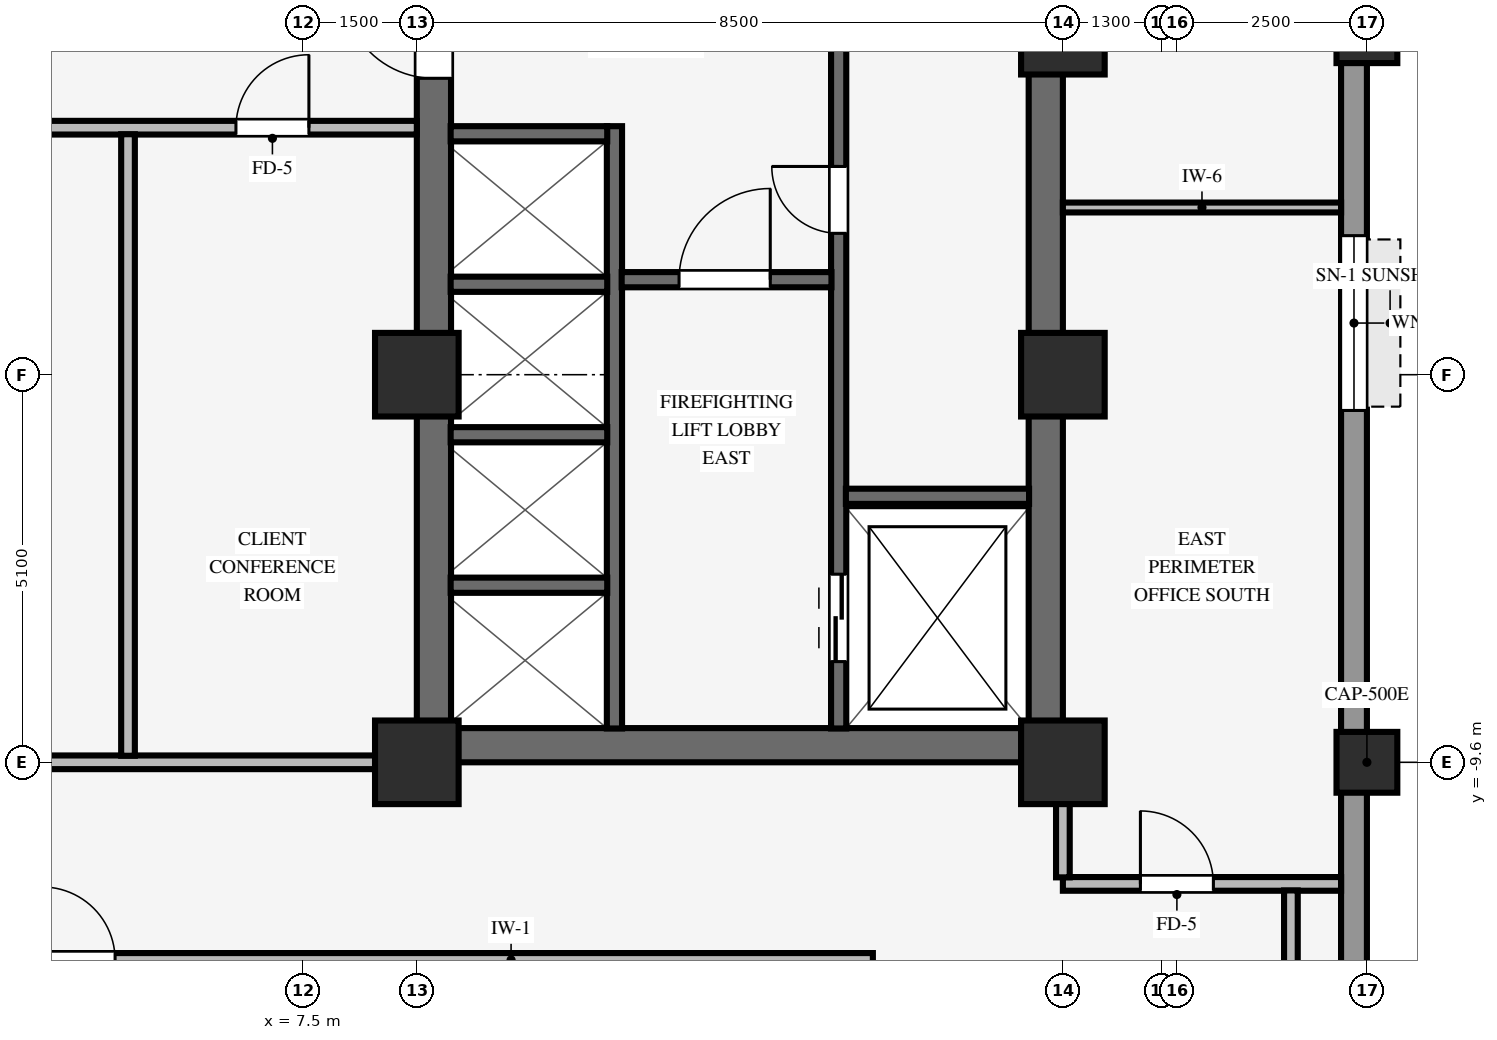
"""IFC4 building model, lengths in metres.
Left out: names, types, materials, properties, quantities, classifications, styles, units other than length and angle.
Written with IfcOpenShell. Run it as: python <this file> out.ifc"""

import sys

from ifc_helpers import new_model, si_unit, direction, frame, frame_2d, origin, origin_2d, place, context, subcontext, project, spatial, rectangle, hollow_rectangle, extrude, source, transform, mapped, element, fill, save


model = new_model("IFC4")
c1 = context("Model", 3, precision=1e-05, world=origin(), true_north=direction((0.0, 1.0)))
c2 = subcontext(c1, "Body", "Model", "MODEL_VIEW")
j1 = project(units=[si_unit("LENGTHUNIT", "METRE"), si_unit("PLANEANGLEUNIT", "RADIAN")], contexts=[c1])
p1 = place(None, origin())
s1 = spatial("IfcSite", under=j1, at=p1, CompositionType="ELEMENT")
p2 = place(p1, origin())
s2 = spatial("IfcBuilding", under=s1, at=p2, CompositionType="ELEMENT")
p3 = place(p2, frame((0.0, 0.0, 82.35)))
s3 = spatial("IfcBuildingStorey", under=s2, at=p3, CompositionType="ELEMENT", Elevation=82.35)
p4 = place(p3, frame((9.0, -9.375, 0.0), z_axis=(0.0, 0.0, 1.0), x_axis=(1.0, 0.0, 0.0)))
e1 = element("IfcWall", 1, at=p4, inside=s3, PredefinedType="SHEAR", context=c2, shape_type="SweptSolid", body=[
    extrude(rectangle(XDim=8.5, YDim=0.45, at=frame_2d((4.25, 0.0))), origin(), (0.0, 0.0, 1.0), 3.25),
])
p5 = place(p3, frame((9.225, -9.155, 0.0), z_axis=(0.0, 0.0, 1.0), x_axis=(0.0, 1.0, 0.0)))
e2 = element("IfcWall", 2, at=p5, inside=s3, PredefinedType="SHEAR", context=c2, shape_type="SweptSolid", body=[
    extrude(rectangle(XDim=18.31, YDim=0.45, at=frame_2d((9.155, 0.0))), origin(), (0.0, 0.0, 1.0), 3.25),
])
p6 = place(p5, frame((8.555, 0.0, 0.0)))
e3 = element("IfcOpeningElement", 3, at=p6, cuts=e2, PredefinedType="OPENING", context=c2, shape_type="SweptSolid", body=[
    extrude(rectangle(XDim=1.2, YDim=2.15, at=frame_2d((0.6, 1.075))), frame((0.0, 0.235, 0.0), z_axis=(0.0, -1.0, 0.0), x_axis=(1.0, 0.0, 0.0)), (0.0, 0.0, 1.0), 0.47),
])
p7 = place(p3, frame((17.275, -9.155, 0.0), z_axis=(0.0, 0.0, 1.0), x_axis=(0.0, 1.0, 0.0)))
e4 = element("IfcWall", 4, at=p7, inside=s3, PredefinedType="SHEAR", context=c2, shape_type="SweptSolid", body=[
    extrude(rectangle(XDim=18.31, YDim=0.45, at=frame_2d((9.155, 0.0))), origin(), (0.0, 0.0, 1.0), 3.25),
])
for number, where, z_axis, x_axis in (
    (5, (9.0, -9.6, 0.0), (0.0, 0.0, 1.0), (1.0, 0.0, 0.0)),
    (6, (9.0, -4.5, 0.0), (0.0, 0.0, 1.0), (1.0, 0.0, 0.0)),
    (7, (17.5, -9.6, 0.0), (0.0, 0.0, 1.0), (1.0, 0.0, 0.0)),
    (8, (17.5, -4.5, 0.0), (0.0, 0.0, 1.0), (1.0, 0.0, 0.0)),
    (9, (17.5, 0.0, 0.0), (0.0, 0.0, 1.0), (1.0, 0.0, 0.0)),
):
    element("IfcColumn", number, at=place(p3, frame(where, z_axis=z_axis, x_axis=x_axis)), inside=s3, PredefinedType="COLUMN", context=c2, shape_type="SweptSolid", body=[
        extrude(rectangle(XDim=1.1, YDim=1.1, at=origin_2d()), origin(), (0.0, 0.0, 1.0), 3.25),
    ])
for number, where, z_axis, x_axis in (
    (10, (21.5, -9.6, 0.0), (0.0, 0.0, 1.0), (1.0, 0.0, 0.0)),
    (11, (21.5, 0.0, 0.0), (0.0, 0.0, 1.0), (1.0, 0.0, 0.0)),
):
    element("IfcColumn", number, at=place(p3, frame(where, z_axis=z_axis, x_axis=x_axis)), inside=s3, PredefinedType="COLUMN", context=c2, shape_type="SweptSolid", body=[
        extrude(hollow_rectangle(XDim=0.8, YDim=0.8, WallThickness=0.055, InnerFilletRadius=0.055, OuterFilletRadius=0.11, at=origin_2d()), origin(), (0.0, 0.0, 1.0), 3.25),
    ])
p8 = place(p3, frame((21.33, -20.764, 0.0), z_axis=(0.0, 0.0, 1.0), x_axis=(0.0, 1.0, 0.0)))
e12 = element("IfcWall", 12, at=p8, inside=s3, PredefinedType="STANDARD", context=c2, shape_type="SweptSolid", body=[
    extrude(rectangle(XDim=41.528, YDim=0.34, at=frame_2d((20.764, 0.0))), origin(), (0.0, 0.0, 1.0), 3.24),
])
p9 = place(p8, frame((15.793, 0.0, 0.8)))
e13 = element("IfcOpeningElement", 13, at=p9, cuts=e12, PredefinedType="OPENING", context=c2, shape_type="SweptSolid", body=[
    extrude(rectangle(XDim=2.3, YDim=1.62, at=frame_2d((1.15, 0.81))), frame((0.0, 0.18, 0.0), z_axis=(0.0, -1.0, 0.0), x_axis=(1.0, 0.0, 0.0)), (0.0, 0.0, 1.0), 0.36),
])
p10 = place(p8, frame((22.084, 0.0, 0.8)))
e14 = element("IfcOpeningElement", 14, at=p10, cuts=e12, PredefinedType="OPENING", context=c2, shape_type="SweptSolid", body=[
    extrude(rectangle(XDim=2.3, YDim=1.62, at=frame_2d((1.15, 0.81))), frame((0.0, 0.18, 0.0), z_axis=(0.0, -1.0, 0.0), x_axis=(1.0, 0.0, 0.0)), (0.0, 0.0, 1.0), 0.36),
])
p11 = place(p3, frame((14.55, -9.155, 0.0), z_axis=(0.0, 0.0, 1.0), x_axis=(0.0, 1.0, 0.0)))
e15 = element("IfcWall", 15, at=p11, inside=s3, PredefinedType="SHEAR", context=c2, shape_type="SweptSolid", body=[
    extrude(rectangle(XDim=10.06, YDim=0.2, at=frame_2d((5.03, 0.0))), origin(), (0.0, 0.0, 1.0), 3.25),
])
p12 = place(p11, frame((6.515, 0.0, 0.0)))
e16 = element("IfcOpeningElement", 16, at=p12, cuts=e15, PredefinedType="OPENING", context=c2, shape_type="SweptSolid", body=[
    extrude(rectangle(XDim=0.88, YDim=2.1, at=frame_2d((0.44, 1.05))), frame((0.0, 0.11, 0.0), z_axis=(0.0, -1.0, 0.0), x_axis=(1.0, 0.0, 0.0)), (0.0, 0.0, 1.0), 0.22),
])
p13 = place(p11, frame((0.88, 0.0, 0.0)))
e17 = element("IfcOpeningElement", 17, at=p13, cuts=e15, PredefinedType="OPENING", context=c2, shape_type="SweptSolid", body=[
    extrude(rectangle(XDim=1.15, YDim=2.15, at=frame_2d((0.575, 1.075))), frame((0.0, 0.11, 0.0), z_axis=(0.0, -1.0, 0.0), x_axis=(1.0, 0.0, 0.0)), (0.0, 0.0, 1.0), 0.22),
])
p14 = place(p3, frame((14.645, -6.1, 0.0), z_axis=(0.0, 0.0, 1.0), x_axis=(1.0, 0.0, 0.0)))
e18 = element("IfcWall", 18, at=p14, inside=s3, PredefinedType="SHEAR", context=c2, shape_type="SweptSolid", body=[
    extrude(rectangle(XDim=2.41, YDim=0.2, at=frame_2d((1.205, 0.0))), origin(), (0.0, 0.0, 1.0), 3.25),
])
p15 = place(p3, frame((11.6, -9.155, 0.0), z_axis=(0.0, 0.0, 1.0), x_axis=(0.0, 1.0, 0.0)))
e19 = element("IfcWall", 19, at=p15, inside=s3, PredefinedType="SHEAR", context=c2, shape_type="SweptSolid", body=[
    extrude(rectangle(XDim=7.925, YDim=0.2, at=frame_2d((3.962, 0.0))), origin(), (0.0, 0.0, 1.0), 3.25),
])
p16 = place(p3, frame((11.695, -3.25, 0.0), z_axis=(0.0, 0.0, 1.0), x_axis=(1.0, 0.0, 0.0)))
e20 = element("IfcWall", 20, at=p16, inside=s3, PredefinedType="SHEAR", context=c2, shape_type="SweptSolid", body=[
    extrude(rectangle(XDim=2.76, YDim=0.2, at=frame_2d((1.38, 0.0))), origin(), (0.0, 0.0, 1.0), 3.25),
])
p17 = place(p16, frame((0.755, 0.0, 0.0)))
e21 = element("IfcOpeningElement", 21, at=p17, cuts=e20, PredefinedType="OPENING", context=c2, shape_type="SweptSolid", body=[
    extrude(rectangle(XDim=1.2, YDim=2.15, at=frame_2d((0.6, 1.075))), frame((0.0, 0.11, 0.0), z_axis=(0.0, -1.0, 0.0), x_axis=(1.0, 0.0, 0.0)), (0.0, 0.0, 1.0), 0.22),
])
for number, where, z_axis, x_axis in (
    (22, (9.445, -7.27, 0.0), (0.0, 0.0, 1.0), (1.0, 0.0, 0.0)),
    (23, (9.445, -5.29, 0.0), (0.0, 0.0, 1.0), (1.0, 0.0, 0.0)),
    (24, (9.445, -3.31, 0.0), (0.0, 0.0, 1.0), (1.0, 0.0, 0.0)),
    (25, (9.445, -1.33, 0.0), (0.0, 0.0, 1.0), (1.0, 0.0, 0.0)),
):
    element("IfcWall", number, at=place(p3, frame(where, z_axis=z_axis, x_axis=x_axis)), inside=s3, PredefinedType="SHEAR", context=c2, shape_type="SweptSolid", body=[
        extrude(rectangle(XDim=2.06, YDim=0.2, at=frame_2d((1.03, 0.0))), origin(), (0.0, 0.0, 1.0), 3.25),
    ])
p18 = place(p3, frame((-15.0, -12.2, 0.0), z_axis=(0.0, 0.0, 1.0), x_axis=(1.0, 0.0, 0.0)))
e26 = element("IfcWall", 26, at=p18, inside=s3, PredefinedType="PARTITIONING", context=c2, shape_type="SweptSolid", body=[
    extrude(rectangle(XDim=30.0, YDim=0.18, at=frame_2d((15.0, 0.0))), origin(), (0.0, 0.0, 1.0), 3.24),
])
p19 = place(p18, frame((19.07, 0.0, 0.0)))
e27 = element("IfcOpeningElement", 27, at=p19, cuts=e26, PredefinedType="OPENING", context=c2, shape_type="SweptSolid", body=[
    extrude(rectangle(XDim=0.96, YDim=2.1, at=frame_2d((0.48, 1.05))), frame((0.0, 0.1, 0.0), z_axis=(0.0, -1.0, 0.0), x_axis=(1.0, 0.0, 0.0)), (0.0, 0.0, 1.0), 0.2),
])
p20 = place(p18, frame((5.45, 0.0, 0.0)))
e28 = element("IfcOpeningElement", 28, at=p20, cuts=e26, PredefinedType="OPENING", context=c2, shape_type="SweptSolid", body=[
    extrude(rectangle(XDim=0.9, YDim=2.1, at=frame_2d((0.45, 1.05))), frame((0.0, 0.1, 0.0), z_axis=(0.0, -1.0, 0.0), x_axis=(1.0, 0.0, 0.0)), (0.0, 0.0, 1.0), 0.2),
])
p21 = place(p18, frame((2.85, 0.0, 0.0)))
e29 = element("IfcOpeningElement", 29, at=p21, cuts=e26, PredefinedType="OPENING", context=c2, shape_type="SweptSolid", body=[
    extrude(rectangle(XDim=0.9, YDim=2.1, at=frame_2d((0.45, 1.05))), frame((0.0, 0.1, 0.0), z_axis=(0.0, -1.0, 0.0), x_axis=(1.0, 0.0, 0.0)), (0.0, 0.0, 1.0), 0.2),
])
p22 = place(p18, frame((12.52, 0.0, 0.0)))
e30 = element("IfcOpeningElement", 30, at=p22, cuts=e26, PredefinedType="OPENING", context=c2, shape_type="SweptSolid", body=[
    extrude(rectangle(XDim=0.96, YDim=2.1, at=frame_2d((0.48, 1.05))), frame((0.0, 0.1, 0.0), z_axis=(0.0, -1.0, 0.0), x_axis=(1.0, 0.0, 0.0)), (0.0, 0.0, 1.0), 0.2),
])
p23 = place(p18, frame((7.95, 0.0, 0.0)))
e31 = element("IfcOpeningElement", 31, at=p23, cuts=e26, PredefinedType="OPENING", context=c2, shape_type="SweptSolid", body=[
    extrude(rectangle(XDim=0.9, YDim=2.1, at=frame_2d((0.45, 1.05))), frame((0.0, 0.1, 0.0), z_axis=(0.0, -1.0, 0.0), x_axis=(1.0, 0.0, 0.0)), (0.0, 0.0, 1.0), 0.2),
])
p24 = place(p3, frame((17.5, -11.2, 0.0), z_axis=(0.0, 0.0, 1.0), x_axis=(1.0, 0.0, 0.0)))
e32 = element("IfcWall", 32, at=p24, inside=s3, PredefinedType="PARTITIONING", context=c2, shape_type="SweptSolid", body=[
    extrude(rectangle(XDim=3.66, YDim=0.18, at=frame_2d((1.83, 0.0))), origin(), (0.0, 0.0, 1.0), 3.24),
])
p25 = place(p24, frame((1.02, 0.0, 0.0)))
e33 = element("IfcOpeningElement", 33, at=p25, cuts=e32, PredefinedType="OPENING", context=c2, shape_type="SweptSolid", body=[
    extrude(rectangle(XDim=0.96, YDim=2.1, at=frame_2d((0.48, 1.05))), frame((0.0, 0.1, 0.0), z_axis=(0.0, -1.0, 0.0), x_axis=(1.0, 0.0, 0.0)), (0.0, 0.0, 1.0), 0.2),
])
p26 = place(p3, frame((0.176, -9.6, 0.0), z_axis=(0.0, 0.0, 1.0), x_axis=(1.0, 0.0, 0.0)))
e34 = element("IfcWall", 34, at=p26, inside=s3, PredefinedType="PARTITIONING", context=c2, shape_type="SweptSolid", body=[
    extrude(rectangle(XDim=8.278, YDim=0.18, at=frame_2d((4.139, 0.0))), origin(), (0.0, 0.0, 1.0), 2.285),
])
p27 = place(p3, frame((17.5, -2.3, 0.0), z_axis=(0.0, 0.0, 1.0), x_axis=(1.0, 0.0, 0.0)))
e35 = element("IfcWall", 35, at=p27, inside=s3, PredefinedType="PARTITIONING", context=c2, shape_type="SweptSolid", body=[
    extrude(rectangle(XDim=3.66, YDim=0.13, at=frame_2d((1.83, 0.0))), origin(), (0.0, 0.0, 1.0), 3.24),
])
p28 = place(p3, frame((-0.8, -1.25, 0.0), z_axis=(0.0, 0.0, 1.0), x_axis=(1.0, 0.0, 0.0)))
e36 = element("IfcWall", 36, at=p28, inside=s3, PredefinedType="PARTITIONING", context=c2, shape_type="SweptSolid", body=[
    extrude(rectangle(XDim=9.8, YDim=0.18, at=frame_2d((4.9, 0.0))), origin(), (0.0, 0.0, 1.0), 3.24),
])
p29 = place(p28, frame((7.42, 0.0, 0.0)))
e37 = element("IfcOpeningElement", 37, at=p29, cuts=e36, PredefinedType="OPENING", context=c2, shape_type="SweptSolid", body=[
    extrude(rectangle(XDim=0.96, YDim=2.1, at=frame_2d((0.48, 1.05))), frame((0.0, 0.1, 0.0), z_axis=(0.0, -1.0, 0.0), x_axis=(1.0, 0.0, 0.0)), (0.0, 0.0, 1.0), 0.2),
])
p30 = place(p3, frame((5.2, -9.514, 0.0), z_axis=(0.0, 0.0, 1.0), x_axis=(0.0, 1.0, 0.0)))
e38 = element("IfcWall", 38, at=p30, inside=s3, PredefinedType="PARTITIONING", context=c2, shape_type="SweptSolid", body=[
    extrude(rectangle(XDim=8.178, YDim=0.18, at=frame_2d((4.089, 0.0))), origin(), (0.0, 0.0, 1.0), 3.24),
])
p31 = place(p3, frame((17.5, -11.114, 0.0), z_axis=(0.0, 0.0, 1.0), x_axis=(0.0, 1.0, 0.0)))
e39 = element("IfcWall", 39, at=p31, inside=s3, PredefinedType="PARTITIONING", context=c2, shape_type="SweptSolid", body=[
    extrude(rectangle(XDim=0.968, YDim=0.18, at=frame_2d((0.484, 0.0))), origin(), (0.0, 0.0, 1.0), 2.618),
])
p32 = place(p3, frame((20.5, -13.514, 0.0), z_axis=(0.0, 0.0, 1.0), x_axis=(0.0, 1.0, 0.0)))
e40 = element("IfcWall", 40, at=p32, inside=s3, PredefinedType="PARTITIONING", context=c2, shape_type="SweptSolid", body=[
    extrude(rectangle(XDim=2.228, YDim=0.18, at=frame_2d((1.114, 0.0))), origin(), (0.0, 0.0, 1.0), 3.24),
])
m1 = source(origin(), c2, "Body", "SweptSolid", [
    extrude(rectangle(XDim=2.3, YDim=1.62, at=frame_2d((1.15, 0.81))), frame((0.0, 0.03, 0.0), z_axis=(0.0, -1.0, 0.0), x_axis=(1.0, 0.0, 0.0)), (0.0, 0.0, 1.0), 0.06),
])
p33 = place(p9, origin())
e41 = element("IfcWindow", 41, at=p33, inside=s3, PartitioningType="SINGLE_PANEL", PredefinedType="WINDOW", context=c2, shape_type="MappedRepresentation", body=[
    mapped(m1, transform((0.0, 0.0, 0.0), scale=1.0)),
])
fill(e13, e41)
m2 = source(origin(), c2, "Body", "SweptSolid", [
    extrude(rectangle(XDim=0.88, YDim=2.1, at=frame_2d((0.44, 1.05))), frame((0.0, 0.025, 0.0), z_axis=(0.0, -1.0, 0.0), x_axis=(1.0, 0.0, 0.0)), (0.0, 0.0, 1.0), 0.05),
])
p34 = place(p12, origin())
e42 = element("IfcDoor", 42, at=p34, inside=s3, OperationType="SINGLE_SWING_RIGHT", PredefinedType="DOOR", context=c2, shape_type="MappedRepresentation", body=[
    mapped(m2, transform((0.0, 0.0, 0.0), scale=1.0)),
])
fill(e16, e42)
m3 = source(origin(), c2, "Body", "SweptSolid", [
    extrude(rectangle(XDim=1.2, YDim=2.15, at=frame_2d((0.6, 1.075))), frame((0.0, 0.025, 0.0), z_axis=(0.0, -1.0, 0.0), x_axis=(1.0, 0.0, 0.0)), (0.0, 0.0, 1.0), 0.05),
])
p35 = place(p17, origin())
e43 = element("IfcDoor", 43, at=p35, inside=s3, OperationType="SINGLE_SWING_RIGHT", PredefinedType="DOOR", context=c2, shape_type="MappedRepresentation", body=[
    mapped(m3, transform((0.0, 0.0, 0.0), scale=1.0)),
])
fill(e21, e43)
p36 = place(p6, origin())
e44 = element("IfcDoor", 44, at=p36, inside=s3, OperationType="SINGLE_SWING_RIGHT", PredefinedType="DOOR", context=c2, shape_type="MappedRepresentation", body=[
    mapped(m3, transform((0.0, 0.0, 0.0), scale=1.0)),
])
fill(e3, e44)
m4 = source(origin(), c2, "Body", "SweptSolid", [
    extrude(rectangle(XDim=1.15, YDim=2.15, at=frame_2d((0.575, 1.075))), frame((0.0, 0.025, 0.0), z_axis=(0.0, -1.0, 0.0), x_axis=(1.0, 0.0, 0.0)), (0.0, 0.0, 1.0), 0.05),
])
p37 = place(p13, origin())
e45 = element("IfcDoor", 45, at=p37, inside=s3, OperationType="DOUBLE_DOOR_SLIDING", PredefinedType="DOOR", context=c2, shape_type="MappedRepresentation", body=[
    mapped(m4, transform((0.0, 0.0, 0.0), scale=1.0)),
])
fill(e17, e45)
m5 = source(origin(), c2, "Body", "SweptSolid", [
    extrude(rectangle(XDim=0.96, YDim=2.1, at=frame_2d((0.48, 1.05))), frame((0.0, 0.025, 0.0), z_axis=(0.0, -1.0, 0.0), x_axis=(1.0, 0.0, 0.0)), (0.0, 0.0, 1.0), 0.05),
])
p38 = place(p19, origin())
e46 = element("IfcDoor", 46, at=p38, inside=s3, OperationType="SINGLE_SWING_LEFT", PredefinedType="DOOR", context=c2, shape_type="MappedRepresentation", body=[
    mapped(m5, transform((0.0, 0.0, 0.0), scale=1.0)),
])
fill(e27, e46)
p39 = place(p29, origin())
e47 = element("IfcDoor", 47, at=p39, inside=s3, OperationType="SINGLE_SWING_RIGHT", PredefinedType="DOOR", context=c2, shape_type="MappedRepresentation", body=[
    mapped(m5, transform((0.0, 0.0, 0.0), scale=1.0)),
])
fill(e37, e47)
p40 = place(p25, origin())
e48 = element("IfcDoor", 48, at=p40, inside=s3, OperationType="SINGLE_SWING_LEFT", PredefinedType="DOOR", context=c2, shape_type="MappedRepresentation", body=[
    mapped(m5, transform((0.0, 0.0, 0.0), scale=1.0)),
])
fill(e33, e48)
save(model, sys.argv[1])
